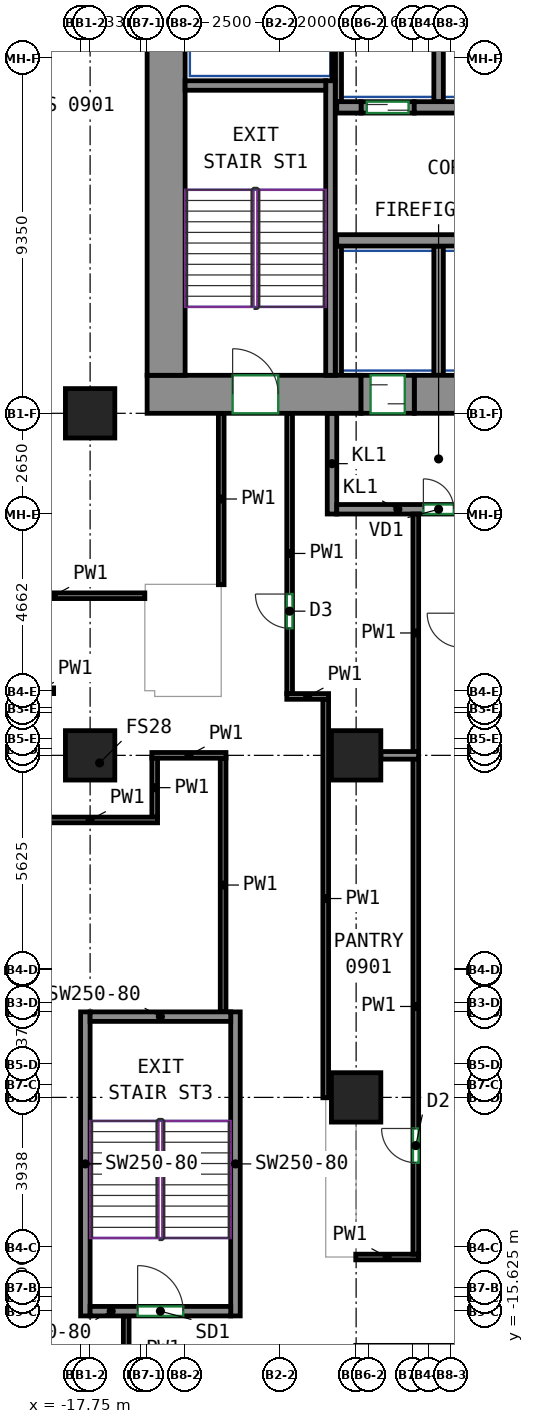
"""IFC4 building model, lengths in metres.
Left out: names, types, materials, properties, quantities, classifications, styles, units other than length and angle.
Written with IfcOpenShell. Run it as: python <this file> out.ifc"""

import sys

from ifc_helpers import new_model, si_unit, direction, frame, frame_2d, origin, origin_2d, place, context, subcontext, project, spatial, rectangle, extrude, source, transform, mapped, element, fill, save


model = new_model("IFC4")
c1 = context("Model", 3, precision=1e-05, world=origin(), true_north=direction((0.0, 1.0)))
c2 = subcontext(c1, "Body", "Model", "MODEL_VIEW")
j1 = project(units=[si_unit("LENGTHUNIT", "METRE"), si_unit("PLANEANGLEUNIT", "RADIAN")], contexts=[c1])
p1 = place(None, origin())
s1 = spatial("IfcSite", under=j1, at=p1, CompositionType="ELEMENT")
p2 = place(p1, origin())
s2 = spatial("IfcBuilding", under=s1, at=p2, CompositionType="ELEMENT")
p3 = place(p2, frame((0.0, 0.0, 43.0)))
s3 = spatial("IfcBuildingStorey", under=s2, at=p3, CompositionType="ELEMENT", Elevation=43.0)
m1 = source(origin(), c2, "Body", "SweptSolid", [
    extrude(rectangle(XDim=1.3, YDim=1.3, at=origin_2d()), origin(), (0.0, 0.0, 1.0), 3.72),
])
for number, where, z_axis, x_axis in (
    (1, (-17.5, -1.0, 0.0), (0.0, 0.0, 1.0), (1.0, 0.0, 0.0)),
    (2, (-17.5, 8.0, 0.0), (0.0, 0.0, 1.0), (1.0, 0.0, 0.0)),
    (3, (-10.5, -10.0, 0.0), (0.0, 0.0, 1.0), (1.0, 0.0, 0.0)),
    (4, (-10.5, -1.0, 0.0), (0.0, 0.0, 1.0), (1.0, 0.0, 0.0)),
):
    element("IfcColumn", number, at=place(p3, frame(where, z_axis=z_axis, x_axis=x_axis)), inside=s3, PredefinedType="COLUMN", context=c2, shape_type="MappedRepresentation", body=[
        mapped(m1, transform((0.0, 0.0, 0.0))),
    ])
m2 = source(origin(), c2, "Body", "SweptSolid", [
    extrude(rectangle(XDim=5.63, YDim=1.0, at=frame_2d((2.815, 0.0))), origin(), (0.0, 0.0, 1.0), 3.72),
])
p4 = place(p3, frame((-16.0, 8.5, 0.0), z_axis=(0.0, 0.0, 1.0), x_axis=(1.0, 0.0, 0.0)))
e5 = element("IfcWall", 5, at=p4, inside=s3, PredefinedType="SHEAR", context=c2, shape_type="MappedRepresentation", body=[
    mapped(m2, transform((0.0, 0.0, 0.0))),
])
p5 = place(p4, frame((2.25, 0.0, 0.0)))
e6 = element("IfcOpeningElement", 6, at=p5, cuts=e5, PredefinedType="OPENING", context=c2, shape_type="SweptSolid", body=[
    extrude(rectangle(XDim=1.2, YDim=2.1, at=frame_2d((0.6, 1.05))), frame((0.0, 0.51, 0.0), z_axis=(0.0, -1.0, 0.0), x_axis=(1.0, 0.0, 0.0)), (0.0, 0.0, 1.0), 1.02),
])
m3 = source(origin(), c2, "Body", "SweptSolid", [
    extrude(rectangle(XDim=1.28, YDim=1.0, at=frame_2d((0.64, 0.0))), origin(), (0.0, 0.0, 1.0), 3.72),
])
p6 = place(p3, frame((-8.97, 8.5, 0.0), z_axis=(0.0, 0.0, 1.0), x_axis=(1.0, 0.0, 0.0)))
e7 = element("IfcWall", 7, at=p6, inside=s3, PredefinedType="SHEAR", context=c2, shape_type="MappedRepresentation", body=[
    mapped(m3, transform((0.0, 0.0, 0.0))),
])
m4 = source(origin(), c2, "Body", "SweptSolid", [
    extrude(rectangle(XDim=12.0, YDim=1.0, at=frame_2d((6.0, 0.0))), origin(), (0.0, 0.0, 1.0), 3.72),
])
p7 = place(p3, frame((-15.5, 9.0, 0.0), z_axis=(0.0, 0.0, 1.0), x_axis=(0.0, 1.0, 0.0)))
e8 = element("IfcWall", 8, at=p7, inside=s3, PredefinedType="SHEAR", context=c2, shape_type="MappedRepresentation", body=[
    mapped(m4, transform((0.0, 0.0, 0.0))),
])
m5 = source(origin(), c2, "Body", "SweptSolid", [
    extrude(rectangle(XDim=7.75, YDim=0.25, at=frame_2d((3.875, 0.0))), origin(), (0.0, 0.0, 1.0), 3.72),
])
p8 = place(p3, frame((-11.175, 9.0, 0.0), z_axis=(0.0, 0.0, 1.0), x_axis=(0.0, 1.0, 0.0)))
e9 = element("IfcWall", 9, at=p8, inside=s3, PredefinedType="SHEAR", context=c2, shape_type="MappedRepresentation", body=[
    mapped(m5, transform((0.0, 0.0, 0.0))),
])
m6 = source(origin(), c2, "Body", "SweptSolid", [
    extrude(rectangle(XDim=3.7, YDim=0.25, at=frame_2d((1.85, 0.0))), origin(), (0.0, 0.0, 1.0), 3.72),
])
p9 = place(p3, frame((-15.0, 16.625, 0.0), z_axis=(0.0, 0.0, 1.0), x_axis=(1.0, 0.0, 0.0)))
e10 = element("IfcWall", 10, at=p9, inside=s3, PredefinedType="SHEAR", context=c2, shape_type="MappedRepresentation", body=[
    mapped(m6, transform((0.0, 0.0, 0.0))),
])
m7 = source(origin(), c2, "Body", "SweptSolid", [
    extrude(rectangle(XDim=8.0, YDim=0.25, at=frame_2d((4.0, 0.0))), origin(), (0.0, 0.0, 1.0), 3.72),
])
for number, where, z_axis, x_axis in (
    (11, (-17.625, -15.75, 0.0), (0.0, 0.0, 1.0), (0.0, 1.0, 0.0)),
    (12, (-13.675, -15.75, 0.0), (0.0, 0.0, 1.0), (0.0, 1.0, 0.0)),
):
    element("IfcWall", number, at=place(p3, frame(where, z_axis=z_axis, x_axis=x_axis)), inside=s3, PredefinedType="SHEAR", context=c2, shape_type="MappedRepresentation", body=[
        mapped(m7, transform((0.0, 0.0, 0.0))),
    ])
p10 = place(p3, frame((-17.5, -15.625, 0.0), z_axis=(0.0, 0.0, 1.0), x_axis=(1.0, 0.0, 0.0)))
e13 = element("IfcWall", 13, at=p10, inside=s3, PredefinedType="SHEAR", context=c2, shape_type="MappedRepresentation", body=[
    mapped(m6, transform((0.0, 0.0, 0.0))),
])
p11 = place(p10, frame((1.25, 0.0, 0.0)))
e14 = element("IfcOpeningElement", 14, at=p11, cuts=e13, PredefinedType="OPENING", context=c2, shape_type="SweptSolid", body=[
    extrude(rectangle(XDim=1.2, YDim=2.1, at=frame_2d((0.6, 1.05))), frame((0.0, 0.135, 0.0), z_axis=(0.0, -1.0, 0.0), x_axis=(1.0, 0.0, 0.0)), (0.0, 0.0, 1.0), 0.27),
])
p12 = place(p3, frame((-17.5, -7.875, 0.0), z_axis=(0.0, 0.0, 1.0), x_axis=(1.0, 0.0, 0.0)))
e15 = element("IfcWall", 15, at=p12, inside=s3, PredefinedType="SHEAR", context=c2, shape_type="MappedRepresentation", body=[
    mapped(m6, transform((0.0, 0.0, 0.0))),
])
m8 = source(origin(), c2, "Body", "SweptSolid", [
    extrude(rectangle(XDim=6.0, YDim=0.3, at=frame_2d((3.0, 0.0))), origin(), (0.0, 0.0, 1.0), 3.72),
])
p13 = place(p3, frame((-11.01, 12.55, 0.0), z_axis=(0.0, 0.0, 1.0), x_axis=(1.0, 0.0, 0.0)))
e16 = element("IfcWall", 16, at=p13, inside=s3, PredefinedType="SHEAR", context=c2, shape_type="MappedRepresentation", body=[
    mapped(m8, transform((0.0, 0.0, 0.0))),
])
m9 = source(origin(), c2, "Body", "SweptSolid", [
    extrude(rectangle(XDim=0.64, YDim=0.3, at=frame_2d((0.32, 0.0))), origin(), (0.0, 0.0, 1.0), 3.72),
])
p14 = place(p3, frame((-11.01, 16.05, 0.0), z_axis=(0.0, 0.0, 1.0), x_axis=(1.0, 0.0, 0.0)))
e17 = element("IfcWall", 17, at=p14, inside=s3, PredefinedType="SHEAR", context=c2, shape_type="MappedRepresentation", body=[
    mapped(m9, transform((0.0, 0.0, 0.0))),
])
m10 = source(origin(), c2, "Body", "SweptSolid", [
    extrude(rectangle(XDim=1.28, YDim=0.3, at=frame_2d((0.64, 0.0))), origin(), (0.0, 0.0, 1.0), 3.72),
])
p15 = place(p3, frame((-8.97, 16.05, 0.0), z_axis=(0.0, 0.0, 1.0), x_axis=(1.0, 0.0, 0.0)))
e18 = element("IfcWall", 18, at=p15, inside=s3, PredefinedType="SHEAR", context=c2, shape_type="MappedRepresentation", body=[
    mapped(m10, transform((0.0, 0.0, 0.0))),
])
m11 = source(origin(), c2, "Body", "SweptSolid", [
    extrude(rectangle(XDim=1.4, YDim=0.3, at=frame_2d((0.7, 0.0))), origin(), (0.0, 0.0, 1.0), 3.72),
])
p16 = place(p3, frame((-10.37, 16.05, 0.0), z_axis=(0.0, 0.0, 1.0), x_axis=(1.0, 0.0, 0.0)))
e19 = element("IfcWall", 19, at=p16, inside=s3, PredefinedType="PARTITIONING", context=c2, shape_type="MappedRepresentation", body=[
    mapped(m11, transform((0.0, 0.0, 0.0))),
])
p17 = place(p16, frame((0.15, 0.0, 0.0)))
e20 = element("IfcOpeningElement", 20, at=p17, cuts=e19, PredefinedType="OPENING", context=c2, shape_type="SweptSolid", body=[
    extrude(rectangle(XDim=1.1, YDim=2.1, at=frame_2d((0.55, 1.05))), frame((0.0, 0.16, 0.0), z_axis=(0.0, -1.0, 0.0), x_axis=(1.0, 0.0, 0.0)), (0.0, 0.0, 1.0), 0.32),
])
m12 = source(origin(), c2, "Body", "SweptSolid", [
    extrude(rectangle(XDim=2.65, YDim=0.25, at=frame_2d((1.325, 0.0))), origin(), (0.0, 0.0, 1.0), 3.72),
])
p18 = place(p3, frame((-11.135, 5.35, 0.0), z_axis=(0.0, 0.0, 1.0), x_axis=(0.0, 1.0, 0.0)))
e21 = element("IfcWall", 21, at=p18, inside=s3, PredefinedType="PARTITIONING", context=c2, shape_type="MappedRepresentation", body=[
    mapped(m12, transform((0.0, 0.0, 0.0))),
])
m13 = source(origin(), c2, "Body", "SweptSolid", [
    extrude(rectangle(XDim=5.36, YDim=0.25, at=frame_2d((2.68, 0.0))), origin(), (0.0, 0.0, 1.0), 3.72),
])
p19 = place(p3, frame((-11.01, 5.475, 0.0), z_axis=(0.0, 0.0, 1.0), x_axis=(1.0, 0.0, 0.0)))
e22 = element("IfcWall", 22, at=p19, inside=s3, PredefinedType="PARTITIONING", context=c2, shape_type="MappedRepresentation", body=[
    mapped(m13, transform((0.0, 0.0, 0.0))),
])
p20 = place(p19, frame((2.28, 0.0, 0.0)))
e23 = element("IfcOpeningElement", 23, at=p20, cuts=e22, PredefinedType="OPENING", context=c2, shape_type="SweptSolid", body=[
    extrude(rectangle(XDim=0.8, YDim=2.0, at=frame_2d((0.4, 1.0))), frame((0.0, 0.135, 0.0), z_axis=(0.0, -1.0, 0.0), x_axis=(1.0, 0.0, 0.0)), (0.0, 0.0, 1.0), 0.27),
])
m14 = source(origin(), c2, "Body", "SweptSolid", [
    extrude(rectangle(XDim=3.275, YDim=0.165, at=frame_2d((1.638, 0.0))), origin(), (0.0, 0.0, 1.0), 3.72),
])
p21 = place(p3, frame((-10.968, 16.2, 0.0), z_axis=(0.0, 0.0, 1.0), x_axis=(0.0, 1.0, 0.0)))
e24 = element("IfcWall", 24, at=p21, inside=s3, PredefinedType="PARTITIONING", context=c2, shape_type="MappedRepresentation", body=[
    mapped(m14, transform((0.0, 0.0, 0.0))),
])
m15 = source(origin(), c2, "Body", "SweptSolid", [
    extrude(rectangle(XDim=2.725, YDim=0.085, at=frame_2d((1.363, 0.0))), origin(), (0.0, 0.0, 1.0), 3.72),
])
p22 = place(p3, frame((-11.093, 16.75, 0.0), z_axis=(0.0, 0.0, 1.0), x_axis=(0.0, 1.0, 0.0)))
e25 = element("IfcWall", 25, at=p22, inside=s3, PredefinedType="PARTITIONING", context=c2, shape_type="MappedRepresentation", body=[
    mapped(m15, transform((0.0, 0.0, 0.0))),
])
m16 = source(origin(), c2, "Body", "SweptSolid", [
    extrude(rectangle(XDim=3.275, YDim=0.25, at=frame_2d((1.638, 0.0))), origin(), (0.0, 0.0, 1.0), 3.72),
])
p23 = place(p3, frame((-8.33, 16.2, 0.0), z_axis=(0.0, 0.0, 1.0), x_axis=(0.0, 1.0, 0.0)))
e26 = element("IfcWall", 26, at=p23, inside=s3, PredefinedType="PARTITIONING", context=c2, shape_type="MappedRepresentation", body=[
    mapped(m16, transform((0.0, 0.0, 0.0))),
])
m17 = source(origin(), c2, "Body", "SweptSolid", [
    extrude(rectangle(XDim=3.4, YDim=0.165, at=frame_2d((1.7, 0.0))), origin(), (0.0, 0.0, 1.0), 3.72),
])
p24 = place(p3, frame((-10.968, 9.0, 0.0), z_axis=(0.0, 0.0, 1.0), x_axis=(0.0, 1.0, 0.0)))
e27 = element("IfcWall", 27, at=p24, inside=s3, PredefinedType="PARTITIONING", context=c2, shape_type="MappedRepresentation", body=[
    mapped(m17, transform((0.0, 0.0, 0.0))),
])
m18 = source(origin(), c2, "Body", "SweptSolid", [
    extrude(rectangle(XDim=3.4, YDim=0.25, at=frame_2d((1.7, 0.0))), origin(), (0.0, 0.0, 1.0), 3.72),
])
p25 = place(p3, frame((-8.33, 9.0, 0.0), z_axis=(0.0, 0.0, 1.0), x_axis=(0.0, 1.0, 0.0)))
e28 = element("IfcWall", 28, at=p25, inside=s3, PredefinedType="PARTITIONING", context=c2, shape_type="MappedRepresentation", body=[
    mapped(m18, transform((0.0, 0.0, 0.0))),
])
m19 = source(origin(), c2, "Body", "SweptSolid", [
    extrude(rectangle(XDim=1.4, YDim=1.0, at=frame_2d((0.7, 0.0))), origin(), (0.0, 0.0, 1.0), 2.7),
])
p26 = place(p3, frame((-10.37, 8.5, 0.0), z_axis=(0.0, 0.0, 1.0), x_axis=(1.0, 0.0, 0.0)))
e29 = element("IfcWall", 29, at=p26, inside=s3, PredefinedType="PARTITIONING", context=c2, shape_type="MappedRepresentation", body=[
    mapped(m19, transform((0.0, 0.0, 0.0))),
])
p27 = place(p26, frame((0.25, 0.0, 0.0)))
e30 = element("IfcOpeningElement", 30, at=p27, cuts=e29, PredefinedType="OPENING", context=c2, shape_type="SweptSolid", body=[
    extrude(rectangle(XDim=0.9, YDim=2.1, at=frame_2d((0.45, 1.05))), frame((0.0, 0.51, 0.0), z_axis=(0.0, -1.0, 0.0), x_axis=(1.0, 0.0, 0.0)), (0.0, 0.0, 1.0), 1.02),
])
p28 = place(p3, frame((-20.875, 3.2, 0.0), z_axis=(0.0, 0.0, 1.0), x_axis=(1.0, 0.0, 0.0)))
e31 = element("IfcWall", 31, at=p28, inside=s3, PredefinedType="PARTITIONING", context=c2, shape_type="SweptSolid", body=[
    extrude(rectangle(XDim=4.815, YDim=0.15, at=frame_2d((2.407, 0.0))), origin(), (0.0, 0.0, 1.0), 3.72),
])
p29 = place(p3, frame((-14.05, 8.0, 0.0), z_axis=(0.0, 0.0, 1.0), x_axis=(0.0, -1.0, 0.0)))
e32 = element("IfcWall", 32, at=p29, inside=s3, PredefinedType="PARTITIONING", context=c2, shape_type="SweptSolid", body=[
    extrude(rectangle(XDim=4.51, YDim=0.15, at=frame_2d((2.255, 0.0))), origin(), (0.0, 0.0, 1.0), 3.72),
])
p30 = place(p3, frame((-12.25, 0.625, 0.0), z_axis=(0.0, 0.0, 1.0), x_axis=(0.0, 1.0, 0.0)))
e33 = element("IfcWall", 33, at=p30, inside=s3, PredefinedType="PARTITIONING", context=c2, shape_type="SweptSolid", body=[
    extrude(rectangle(XDim=7.375, YDim=0.15, at=frame_2d((3.688, 0.0))), origin(), (0.0, 0.0, 1.0), 3.72),
])
p31 = place(p30, frame((1.719, 0.0, 0.0)))
e34 = element("IfcOpeningElement", 34, at=p31, cuts=e33, PredefinedType="OPENING", context=c2, shape_type="SweptSolid", body=[
    extrude(rectangle(XDim=0.9, YDim=2.1, at=frame_2d((0.45, 1.05))), frame((0.0, 0.085, 0.0), z_axis=(0.0, -1.0, 0.0), x_axis=(1.0, 0.0, 0.0)), (0.0, 0.0, 1.0), 0.17),
])
p32 = place(p3, frame((-12.325, 0.55, 0.0), z_axis=(0.0, 0.0, 1.0), x_axis=(1.0, 0.0, 0.0)))
e35 = element("IfcWall", 35, at=p32, inside=s3, PredefinedType="PARTITIONING", context=c2, shape_type="SweptSolid", body=[
    extrude(rectangle(XDim=1.1, YDim=0.15, at=frame_2d((0.55, 0.0))), origin(), (0.0, 0.0, 1.0), 3.72),
])
p33 = place(p3, frame((-8.93, -0.91, 0.0), z_axis=(0.0, 0.0, 1.0), x_axis=(0.0, 1.0, 0.0)))
e36 = element("IfcWall", 36, at=p33, inside=s3, PredefinedType="PARTITIONING", context=c2, shape_type="SweptSolid", body=[
    extrude(rectangle(XDim=6.26, YDim=0.15, at=frame_2d((3.13, 0.0))), origin(), (0.0, 0.0, 1.0), 3.72),
])
p34 = place(p3, frame((-11.3, -10.01, 0.0), z_axis=(0.0, 0.0, 1.0), x_axis=(0.0, 1.0, 0.0)))
e37 = element("IfcWall", 37, at=p34, inside=s3, PredefinedType="PARTITIONING", context=c2, shape_type="SweptSolid", body=[
    extrude(rectangle(XDim=10.485, YDim=0.15, at=frame_2d((5.243, 0.0))), origin(), (0.0, 0.0, 1.0), 3.72),
])
p35 = place(p3, frame((-10.51, -14.2, 0.0), z_axis=(0.0, 0.0, 1.0), x_axis=(1.0, 0.0, 0.0)))
e38 = element("IfcWall", 38, at=p35, inside=s3, PredefinedType="PARTITIONING", context=c2, shape_type="SweptSolid", body=[
    extrude(rectangle(XDim=1.655, YDim=0.15, at=frame_2d((0.828, 0.0))), origin(), (0.0, 0.0, 1.0), 3.72),
])
p36 = place(p3, frame((-8.93, -14.125, 0.0), z_axis=(0.0, 0.0, 1.0), x_axis=(0.0, 1.0, 0.0)))
e39 = element("IfcWall", 39, at=p36, inside=s3, PredefinedType="PARTITIONING", context=c2, shape_type="SweptSolid", body=[
    extrude(rectangle(XDim=13.035, YDim=0.15, at=frame_2d((6.518, 0.0))), origin(), (0.0, 0.0, 1.0), 3.72),
])
p37 = place(p36, frame((2.407, 0.0, 0.0)))
e40 = element("IfcOpeningElement", 40, at=p37, cuts=e39, PredefinedType="OPENING", context=c2, shape_type="SweptSolid", body=[
    extrude(rectangle(XDim=0.9, YDim=2.1, at=frame_2d((0.45, 1.05))), frame((0.0, 0.085, 0.0), z_axis=(0.0, -1.0, 0.0), x_axis=(1.0, 0.0, 0.0)), (0.0, 0.0, 1.0), 0.17),
])
p38 = place(p3, frame((-16.55, -15.75, 0.0), z_axis=(0.0, 0.0, 1.0), x_axis=(0.0, -1.0, 0.0)))
e41 = element("IfcWall", 41, at=p38, inside=s3, PredefinedType="PARTITIONING", context=c2, shape_type="SweptSolid", body=[
    extrude(rectangle(XDim=1.725, YDim=0.15, at=frame_2d((0.863, 0.0))), origin(), (0.0, 0.0, 1.0), 3.72),
])
p39 = place(p3, frame((-14.0, -1.075, 0.0), z_axis=(0.0, 0.0, 1.0), x_axis=(0.0, -1.0, 0.0)))
e42 = element("IfcWall", 42, at=p39, inside=s3, PredefinedType="PARTITIONING", context=c2, shape_type="SweptSolid", body=[
    extrude(rectangle(XDim=6.675, YDim=0.15, at=frame_2d((3.337, 0.0))), origin(), (0.0, 0.0, 1.0), 3.72),
])
p40 = place(p3, frame((-15.875, -1.0, 0.0), z_axis=(0.0, 0.0, 1.0), x_axis=(1.0, 0.0, 0.0)))
e43 = element("IfcWall", 43, at=p40, inside=s3, PredefinedType="PARTITIONING", context=c2, shape_type="SweptSolid", body=[
    extrude(rectangle(XDim=1.95, YDim=0.15, at=frame_2d((0.975, 0.0))), origin(), (0.0, 0.0, 1.0), 3.72),
])
p41 = place(p3, frame((-15.8, -2.625, 0.0), z_axis=(0.0, 0.0, 1.0), x_axis=(0.0, 1.0, 0.0)))
e44 = element("IfcWall", 44, at=p41, inside=s3, PredefinedType="PARTITIONING", context=c2, shape_type="SweptSolid", body=[
    extrude(rectangle(XDim=1.55, YDim=0.15, at=frame_2d((0.775, 0.0))), origin(), (0.0, 0.0, 1.0), 3.72),
])
p42 = place(p3, frame((-19.275, -2.7, 0.0), z_axis=(0.0, 0.0, 1.0), x_axis=(1.0, 0.0, 0.0)))
e45 = element("IfcWall", 45, at=p42, inside=s3, PredefinedType="PARTITIONING", context=c2, shape_type="SweptSolid", body=[
    extrude(rectangle(XDim=3.55, YDim=0.15, at=frame_2d((1.775, 0.0))), origin(), (0.0, 0.0, 1.0), 3.72),
])
p43 = place(p3, frame((-19.275, 0.7, 0.0), z_axis=(0.0, 0.0, 1.0), x_axis=(1.0, 0.0, 0.0)))
e46 = element("IfcWall", 46, at=p43, inside=s3, PredefinedType="PARTITIONING", context=c2, shape_type="SweptSolid", body=[
    extrude(rectangle(XDim=0.815, YDim=0.15, at=frame_2d((0.407, 0.0))), origin(), (0.0, 0.0, 1.0), 3.72),
])
p44 = place(p3, frame((-9.85, -1.0, 0.0), z_axis=(0.0, 0.0, 1.0), x_axis=(1.0, 0.0, 0.0)))
e47 = element("IfcWall", 47, at=p44, inside=s3, PredefinedType="PARTITIONING", context=c2, shape_type="SweptSolid", body=[
    extrude(rectangle(XDim=0.994, YDim=0.2, at=frame_2d((0.497, 0.0))), origin(), (0.0, 0.0, 1.0), 3.07),
])
p45 = place(p20, origin())
e48 = element("IfcDoor", 48, at=p45, inside=s3, OperationType="SINGLE_SWING_LEFT", PredefinedType="DOOR", context=c2, shape_type="SweptSolid", body=[
    extrude(rectangle(XDim=0.8, YDim=2.0, at=frame_2d((0.4, 1.0))), frame((0.0, 0.025, 0.0), z_axis=(0.0, -1.0, 0.0), x_axis=(1.0, 0.0, 0.0)), (0.0, 0.0, 1.0), 0.05),
])
fill(e23, e48)
p46 = place(p27, origin())
e49 = element("IfcDoor", 49, at=p46, inside=s3, OperationType="SLIDING_TO_LEFT", PredefinedType="DOOR", context=c2, shape_type="SweptSolid", body=[
    extrude(rectangle(XDim=0.9, YDim=2.1, at=frame_2d((0.45, 1.05))), frame((0.0, 0.405, 0.0), z_axis=(0.0, -1.0, 0.0), x_axis=(1.0, 0.0, 0.0)), (0.0, 0.0, 1.0), 0.05),
])
fill(e30, e49)
p47 = place(p17, origin())
e50 = element("IfcDoor", 50, at=p47, inside=s3, OperationType="DOUBLE_DOOR_SLIDING", PredefinedType="DOOR", context=c2, shape_type="SweptSolid", body=[
    extrude(rectangle(XDim=1.1, YDim=2.1, at=frame_2d((0.55, 1.05))), frame((0.0, 0.025, 0.0), z_axis=(0.0, -1.0, 0.0), x_axis=(1.0, 0.0, 0.0)), (0.0, 0.0, 1.0), 0.05),
])
fill(e20, e50)
p48 = place(p5, origin())
e51 = element("IfcDoor", 51, at=p48, inside=s3, OperationType="DOUBLE_DOOR_SINGLE_SWING", PredefinedType="DOOR", context=c2, shape_type="SweptSolid", body=[
    extrude(rectangle(XDim=1.2, YDim=2.1, at=frame_2d((0.6, 1.05))), frame((0.0, 0.405, 0.0), z_axis=(0.0, -1.0, 0.0), x_axis=(1.0, 0.0, 0.0)), (0.0, 0.0, 1.0), 0.05),
])
fill(e6, e51)
p49 = place(p11, origin())
e52 = element("IfcDoor", 52, at=p49, inside=s3, OperationType="DOUBLE_DOOR_SINGLE_SWING", PredefinedType="DOOR", context=c2, shape_type="SweptSolid", body=[
    extrude(rectangle(XDim=1.2, YDim=2.1, at=frame_2d((0.6, 1.05))), frame((0.0, 0.025, 0.0), z_axis=(0.0, -1.0, 0.0), x_axis=(1.0, 0.0, 0.0)), (0.0, 0.0, 1.0), 0.05),
])
fill(e14, e52)
p50 = place(p37, origin())
e53 = element("IfcDoor", 53, at=p50, inside=s3, OperationType="SINGLE_SWING_RIGHT", PredefinedType="DOOR", context=c2, shape_type="SweptSolid", body=[
    extrude(rectangle(XDim=0.9, YDim=2.1, at=frame_2d((0.45, 1.05))), frame((0.0, 0.025, 0.0), z_axis=(0.0, -1.0, 0.0), x_axis=(1.0, 0.0, 0.0)), (0.0, 0.0, 1.0), 0.05),
])
fill(e40, e53)
p51 = place(p31, origin())
e54 = element("IfcDoor", 54, at=p51, inside=s3, OperationType="SINGLE_SWING_RIGHT", PredefinedType="DOOR", context=c2, shape_type="SweptSolid", body=[
    extrude(rectangle(XDim=0.9, YDim=2.1, at=frame_2d((0.45, 1.05))), frame((0.0, 0.025, 0.0), z_axis=(0.0, -1.0, 0.0), x_axis=(1.0, 0.0, 0.0)), (0.0, 0.0, 1.0), 0.05),
])
fill(e34, e54)
save(model, sys.argv[1])
